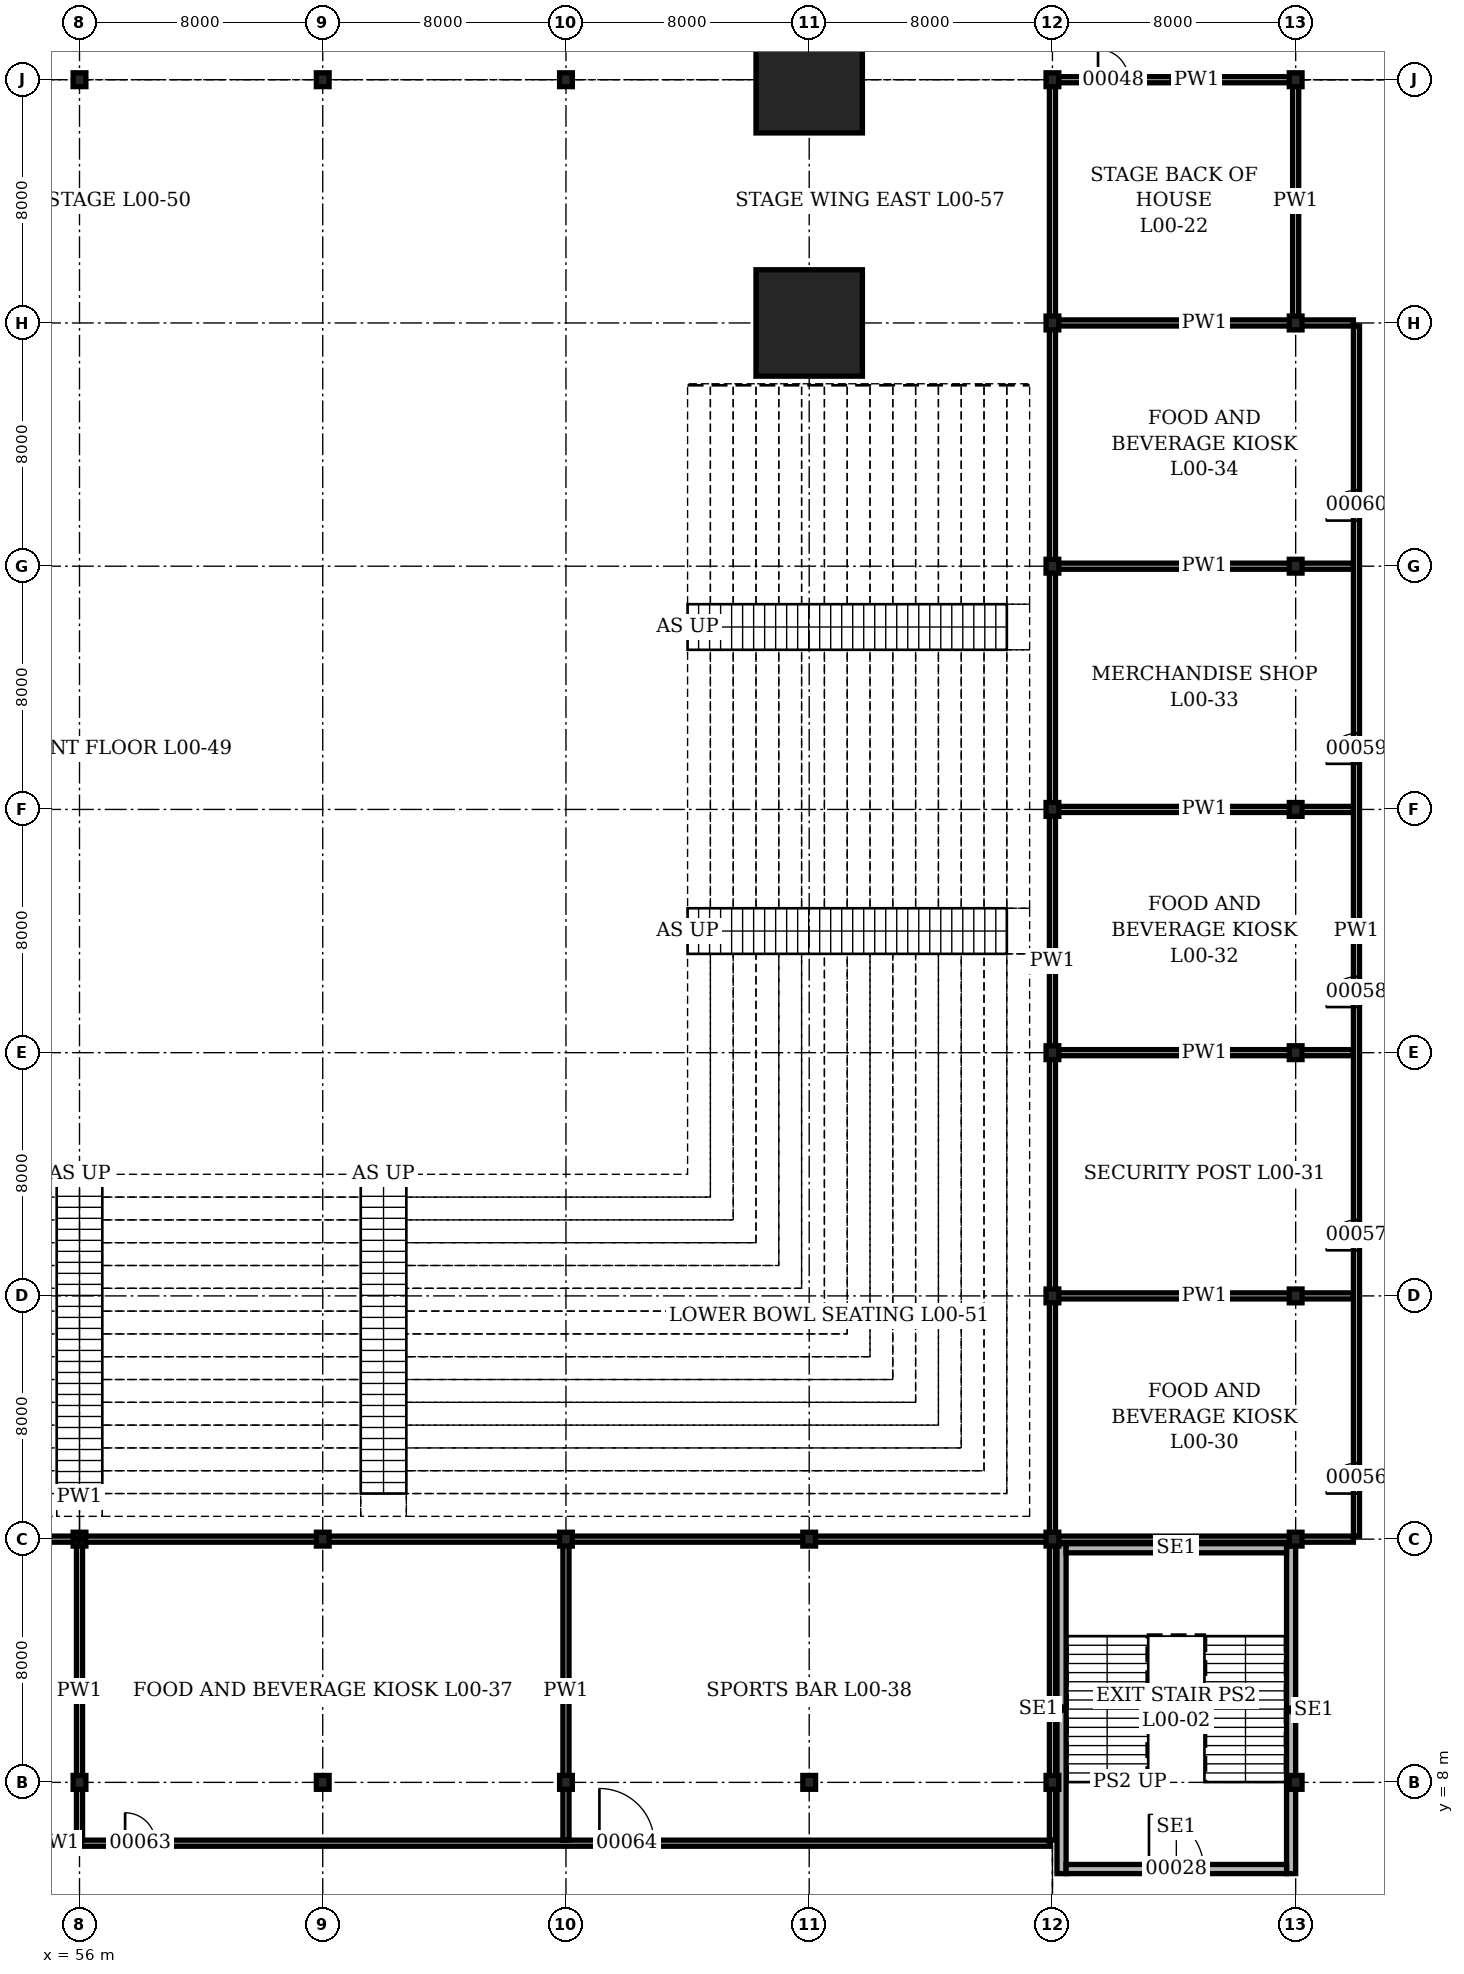
"""IFC4 building model, lengths in metres.
Left out: names, types, materials, properties, quantities, classifications, styles, units other than length and angle.
Written with IfcOpenShell. Run it as: python <this file> out.ifc"""

import sys

from ifc_helpers import new_model, si_unit, direction, frame, frame_2d, origin, origin_2d, place, context, subcontext, project, spatial, rectangle, hollow_rectangle, i_section, extrude, element, fill, save


model = new_model("IFC4")
c1 = context("Model", 3, precision=1e-05, world=origin(), true_north=direction((0.0, 1.0)))
c2 = subcontext(c1, "Body", "Model", "MODEL_VIEW")
j1 = project(units=[si_unit("LENGTHUNIT", "METRE"), si_unit("PLANEANGLEUNIT", "RADIAN")], contexts=[c1])
p1 = place(None, origin())
s1 = spatial("IfcSite", under=j1, at=p1, CompositionType="ELEMENT")
p2 = place(p1, origin())
s2 = spatial("IfcBuilding", under=s1, at=p2, CompositionType="ELEMENT")
p3 = place(p2, origin())
s3 = spatial("IfcBuildingStorey", under=s2, at=p3, CompositionType="ELEMENT", Elevation=0.0)
for number, where, z_axis, x_axis in (
    (1, (56.0, 8.0, 0.0), (0.0, 0.0, 1.0), (1.0, 0.0, 0.0)),
    (2, (56.0, 16.0, 0.0), (0.0, 0.0, 1.0), (1.0, 0.0, 0.0)),
    (3, (56.0, 64.0, 0.0), (0.0, 0.0, 1.0), (1.0, 0.0, 0.0)),
    (4, (64.0, 8.0, 0.0), (0.0, 0.0, 1.0), (1.0, 0.0, 0.0)),
    (5, (64.0, 16.0, 0.0), (0.0, 0.0, 1.0), (1.0, 0.0, 0.0)),
    (6, (64.0, 64.0, 0.0), (0.0, 0.0, 1.0), (1.0, 0.0, 0.0)),
    (7, (72.0, 8.0, 0.0), (0.0, 0.0, 1.0), (1.0, 0.0, 0.0)),
    (8, (72.0, 16.0, 0.0), (0.0, 0.0, 1.0), (1.0, 0.0, 0.0)),
    (9, (72.0, 64.0, 0.0), (0.0, 0.0, 1.0), (1.0, 0.0, 0.0)),
    (10, (80.0, 8.0, 0.0), (0.0, 0.0, 1.0), (1.0, 0.0, 0.0)),
    (11, (80.0, 16.0, 0.0), (0.0, 0.0, 1.0), (1.0, 0.0, 0.0)),
):
    element("IfcColumn", number, at=place(p3, frame(where, z_axis=z_axis, x_axis=x_axis)), inside=s3, PredefinedType="COLUMN", context=c2, shape_type="SweptSolid", body=[
        extrude(i_section(OverallWidth=0.419, OverallDepth=0.455, WebThickness=0.042, FlangeThickness=0.068, at=origin_2d()), origin(), (0.0, 0.0, 1.0), 4.9),
    ])
for number, where, z_axis, x_axis in (
    (12, (80.0, 56.0, 0.0), (0.0, 0.0, 1.0), (1.0, 0.0, 0.0)),
    (13, (80.0, 64.0, 0.0), (0.0, 0.0, 1.0), (1.0, 0.0, 0.0)),
):
    element("IfcColumn", number, at=place(p3, frame(where, z_axis=z_axis, x_axis=x_axis)), inside=s3, PredefinedType="COLUMN", context=c2, shape_type="SweptSolid", body=[
        extrude(hollow_rectangle(XDim=3.5, YDim=3.5, WallThickness=0.5, at=origin_2d()), origin(), (0.0, 0.0, 1.0), 4.9),
    ])
for number, where, z_axis, x_axis in (
    (14, (88.0, 8.0, 0.0), (0.0, 0.0, 1.0), (1.0, 0.0, 0.0)),
    (15, (88.0, 16.0, 0.0), (0.0, 0.0, 1.0), (1.0, 0.0, 0.0)),
    (16, (88.0, 24.0, 0.0), (0.0, 0.0, 1.0), (1.0, 0.0, 0.0)),
    (17, (88.0, 32.0, 0.0), (0.0, 0.0, 1.0), (1.0, 0.0, 0.0)),
    (18, (88.0, 40.0, 0.0), (0.0, 0.0, 1.0), (1.0, 0.0, 0.0)),
    (19, (88.0, 48.0, 0.0), (0.0, 0.0, 1.0), (1.0, 0.0, 0.0)),
    (20, (88.0, 56.0, 0.0), (0.0, 0.0, 1.0), (1.0, 0.0, 0.0)),
    (21, (88.0, 64.0, 0.0), (0.0, 0.0, 1.0), (1.0, 0.0, 0.0)),
    (22, (96.0, 8.0, 0.0), (0.0, 0.0, 1.0), (1.0, 0.0, 0.0)),
    (23, (96.0, 16.0, 0.0), (0.0, 0.0, 1.0), (1.0, 0.0, 0.0)),
    (24, (96.0, 24.0, 0.0), (0.0, 0.0, 1.0), (1.0, 0.0, 0.0)),
    (25, (96.0, 32.0, 0.0), (0.0, 0.0, 1.0), (1.0, 0.0, 0.0)),
    (26, (96.0, 40.0, 0.0), (0.0, 0.0, 1.0), (1.0, 0.0, 0.0)),
    (27, (96.0, 48.0, 0.0), (0.0, 0.0, 1.0), (1.0, 0.0, 0.0)),
    (28, (96.0, 56.0, 0.0), (0.0, 0.0, 1.0), (1.0, 0.0, 0.0)),
    (29, (96.0, 64.0, 0.0), (0.0, 0.0, 1.0), (1.0, 0.0, 0.0)),
):
    element("IfcColumn", number, at=place(p3, frame(where, z_axis=z_axis, x_axis=x_axis)), inside=s3, PredefinedType="COLUMN", context=c2, shape_type="SweptSolid", body=[
        extrude(i_section(OverallWidth=0.419, OverallDepth=0.455, WebThickness=0.042, FlangeThickness=0.068, at=origin_2d()), origin(), (0.0, 0.0, 1.0), 4.9),
    ])
p4 = place(p3, frame((88.3, 5.0, 0.0), z_axis=(0.0, 0.0, 1.0), x_axis=(0.0, 1.0, 0.0)))
e30 = element("IfcWall", 30, at=p4, inside=s3, PredefinedType="SOLIDWALL", context=c2, shape_type="SweptSolid", body=[
    extrude(rectangle(XDim=10.85, YDim=0.3, at=frame_2d((5.425, 0.0))), origin(), (0.0, 0.0, 1.0), 4.7),
])
p5 = place(p3, frame((95.85, 5.0, 0.0), z_axis=(0.0, 0.0, 1.0), x_axis=(0.0, 1.0, 0.0)))
e31 = element("IfcWall", 31, at=p5, inside=s3, PredefinedType="SOLIDWALL", context=c2, shape_type="SweptSolid", body=[
    extrude(rectangle(XDim=10.773, YDim=0.3, at=frame_2d((5.386, 0.0))), origin(), (0.0, 0.0, 1.0), 4.7),
])
p6 = place(p3, frame((88.45, 5.15, 0.0), z_axis=(0.0, 0.0, 1.0), x_axis=(1.0, 0.0, 0.0)))
e32 = element("IfcWall", 32, at=p6, inside=s3, PredefinedType="SOLIDWALL", context=c2, shape_type="SweptSolid", body=[
    extrude(rectangle(XDim=7.25, YDim=0.3, at=frame_2d((3.625, 0.0))), origin(), (0.0, 0.0, 1.0), 4.7),
])
p7 = place(p6, frame((2.725, 0.0, 0.0)))
e33 = element("IfcOpeningElement", 33, at=p7, cuts=e32, PredefinedType="OPENING", context=c2, shape_type="SweptSolid", body=[
    extrude(rectangle(XDim=1.8, YDim=2.1, at=frame_2d((0.9, 1.05))), frame((0.0, 0.16, 0.0), z_axis=(0.0, -1.0, 0.0), x_axis=(1.0, 0.0, 0.0)), (0.0, 0.0, 1.0), 0.32),
])
p8 = place(p3, frame((88.45, 15.7, 0.0), z_axis=(0.0, 0.0, 1.0), x_axis=(1.0, 0.0, 0.0)))
e34 = element("IfcWall", 34, at=p8, inside=s3, PredefinedType="SOLIDWALL", context=c2, shape_type="SweptSolid", body=[
    extrude(rectangle(XDim=7.25, YDim=0.3, at=frame_2d((3.625, 0.0))), origin(), (0.0, 0.0, 1.0), 4.7),
])
p9 = place(p3, frame((24.1, 6.0, 0.0), z_axis=(0.0, 0.0, 1.0), x_axis=(1.0, 0.0, 0.0)))
e35 = element("IfcWall", 35, at=p9, inside=s3, PredefinedType="PARTITIONING", context=c2, shape_type="SweptSolid", body=[
    extrude(rectangle(XDim=63.8, YDim=0.2, at=frame_2d((31.9, 0.0))), origin(), (0.0, 0.0, 1.0), 4.7),
])
p10 = place(p9, frame((1.4, 0.0, 0.0)))
e36 = element("IfcOpeningElement", 36, at=p10, cuts=e35, PredefinedType="OPENING", context=c2, shape_type="SweptSolid", body=[
    extrude(rectangle(XDim=1.0, YDim=2.1, at=frame_2d((0.5, 1.05))), frame((0.0, 0.11, 0.0), z_axis=(0.0, -1.0, 0.0), x_axis=(1.0, 0.0, 0.0)), (0.0, 0.0, 1.0), 0.22),
])
p11 = place(p9, frame((17.4, 0.0, 0.0)))
e37 = element("IfcOpeningElement", 37, at=p11, cuts=e35, PredefinedType="OPENING", context=c2, shape_type="SweptSolid", body=[
    extrude(rectangle(XDim=1.0, YDim=2.1, at=frame_2d((0.5, 1.05))), frame((0.0, 0.11, 0.0), z_axis=(0.0, -1.0, 0.0), x_axis=(1.0, 0.0, 0.0)), (0.0, 0.0, 1.0), 0.22),
])
p12 = place(p9, frame((33.4, 0.0, 0.0)))
e38 = element("IfcOpeningElement", 38, at=p12, cuts=e35, PredefinedType="OPENING", context=c2, shape_type="SweptSolid", body=[
    extrude(rectangle(XDim=1.0, YDim=2.1, at=frame_2d((0.5, 1.05))), frame((0.0, 0.11, 0.0), z_axis=(0.0, -1.0, 0.0), x_axis=(1.0, 0.0, 0.0)), (0.0, 0.0, 1.0), 0.22),
])
p13 = place(p9, frame((49.0, 0.0, 0.0)))
e39 = element("IfcOpeningElement", 39, at=p13, cuts=e35, PredefinedType="OPENING", context=c2, shape_type="SweptSolid", body=[
    extrude(rectangle(XDim=1.8, YDim=2.4, at=frame_2d((0.9, 1.2))), frame((0.0, 0.11, 0.0), z_axis=(0.0, -1.0, 0.0), x_axis=(1.0, 0.0, 0.0)), (0.0, 0.0, 1.0), 0.22),
])
p14 = place(p3, frame((14.1, 16.0, 0.0), z_axis=(0.0, 0.0, 1.0), x_axis=(1.0, 0.0, 0.0)))
e40 = element("IfcWall", 40, at=p14, inside=s3, PredefinedType="PARTITIONING", context=c2, shape_type="SweptSolid", body=[
    extrude(rectangle(XDim=83.8, YDim=0.2, at=frame_2d((41.9, 0.0))), origin(), (0.0, 0.0, 1.0), 3.928),
])
for number, where, z_axis, x_axis in (
    (41, (88.1, 24.0, 0.0), (0.0, 0.0, 1.0), (1.0, 0.0, 0.0)),
    (42, (88.1, 32.0, 0.0), (0.0, 0.0, 1.0), (1.0, 0.0, 0.0)),
    (43, (88.1, 40.0, 0.0), (0.0, 0.0, 1.0), (1.0, 0.0, 0.0)),
    (44, (88.1, 48.0, 0.0), (0.0, 0.0, 1.0), (1.0, 0.0, 0.0)),
    (45, (88.1, 56.0, 0.0), (0.0, 0.0, 1.0), (1.0, 0.0, 0.0)),
):
    element("IfcWall", number, at=place(p3, frame(where, z_axis=z_axis, x_axis=x_axis)), inside=s3, PredefinedType="PARTITIONING", context=c2, shape_type="SweptSolid", body=[
        extrude(rectangle(XDim=9.8, YDim=0.2, at=frame_2d((4.9, 0.0))), origin(), (0.0, 0.0, 1.0), 3.928),
    ])
p15 = place(p3, frame((88.1, 64.0, 0.0), z_axis=(0.0, 0.0, 1.0), x_axis=(1.0, 0.0, 0.0)))
e46 = element("IfcWall", 46, at=p15, inside=s3, PredefinedType="PARTITIONING", context=c2, shape_type="SweptSolid", body=[
    extrude(rectangle(XDim=7.8, YDim=0.2, at=frame_2d((3.9, 0.0))), origin(), (0.0, 0.0, 1.0), 3.928),
])
p16 = place(p15, frame((1.4, 0.0, 0.0)))
e47 = element("IfcOpeningElement", 47, at=p16, cuts=e46, PredefinedType="OPENING", context=c2, shape_type="SweptSolid", body=[
    extrude(rectangle(XDim=1.0, YDim=2.1, at=frame_2d((0.5, 1.05))), frame((0.0, 0.11, 0.0), z_axis=(0.0, -1.0, 0.0), x_axis=(1.0, 0.0, 0.0)), (0.0, 0.0, 1.0), 0.22),
])
for number, where, z_axis, x_axis in (
    (48, (56.0, 6.1, 0.0), (0.0, 0.0, 1.0), (0.0, 1.0, 0.0)),
    (49, (72.0, 6.1, 0.0), (0.0, 0.0, 1.0), (0.0, 1.0, 0.0)),
):
    element("IfcWall", number, at=place(p3, frame(where, z_axis=z_axis, x_axis=x_axis)), inside=s3, PredefinedType="PARTITIONING", context=c2, shape_type="SweptSolid", body=[
        extrude(rectangle(XDim=9.8, YDim=0.2, at=frame_2d((4.9, 0.0))), origin(), (0.0, 0.0, 1.0), 3.928),
    ])
p17 = place(p3, frame((88.0, 6.1, 0.0), z_axis=(0.0, 0.0, 1.0), x_axis=(0.0, 1.0, 0.0)))
e50 = element("IfcWall", 50, at=p17, inside=s3, PredefinedType="PARTITIONING", context=c2, shape_type="SweptSolid", body=[
    extrude(rectangle(XDim=57.8, YDim=0.2, at=frame_2d((28.9, 0.0))), origin(), (0.0, 0.0, 1.0), 3.928),
])
p18 = place(p3, frame((96.0, 56.1, 0.0), z_axis=(0.0, 0.0, 1.0), x_axis=(0.0, 1.0, 0.0)))
e51 = element("IfcWall", 51, at=p18, inside=s3, PredefinedType="PARTITIONING", context=c2, shape_type="SweptSolid", body=[
    extrude(rectangle(XDim=7.8, YDim=0.2, at=frame_2d((3.9, 0.0))), origin(), (0.0, 0.0, 1.0), 3.928),
])
p19 = place(p3, frame((98.0, 16.1, 0.0), z_axis=(0.0, 0.0, 1.0), x_axis=(0.0, 1.0, 0.0)))
e52 = element("IfcWall", 52, at=p19, inside=s3, PredefinedType="PARTITIONING", context=c2, shape_type="SweptSolid", body=[
    extrude(rectangle(XDim=39.8, YDim=0.2, at=frame_2d((19.9, 0.0))), origin(), (0.0, 0.0, 1.0), 4.7),
])
p20 = place(p19, frame((1.4, 0.0, 0.0)))
e53 = element("IfcOpeningElement", 53, at=p20, cuts=e52, PredefinedType="OPENING", context=c2, shape_type="SweptSolid", body=[
    extrude(rectangle(XDim=1.0, YDim=2.1, at=frame_2d((0.5, 1.05))), frame((0.0, 0.11, 0.0), z_axis=(0.0, -1.0, 0.0), x_axis=(1.0, 0.0, 0.0)), (0.0, 0.0, 1.0), 0.22),
])
p21 = place(p19, frame((9.4, 0.0, 0.0)))
e54 = element("IfcOpeningElement", 54, at=p21, cuts=e52, PredefinedType="OPENING", context=c2, shape_type="SweptSolid", body=[
    extrude(rectangle(XDim=1.0, YDim=2.1, at=frame_2d((0.5, 1.05))), frame((0.0, 0.11, 0.0), z_axis=(0.0, -1.0, 0.0), x_axis=(1.0, 0.0, 0.0)), (0.0, 0.0, 1.0), 0.22),
])
p22 = place(p19, frame((17.4, 0.0, 0.0)))
e55 = element("IfcOpeningElement", 55, at=p22, cuts=e52, PredefinedType="OPENING", context=c2, shape_type="SweptSolid", body=[
    extrude(rectangle(XDim=1.0, YDim=2.1, at=frame_2d((0.5, 1.05))), frame((0.0, 0.11, 0.0), z_axis=(0.0, -1.0, 0.0), x_axis=(1.0, 0.0, 0.0)), (0.0, 0.0, 1.0), 0.22),
])
p23 = place(p19, frame((25.4, 0.0, 0.0)))
e56 = element("IfcOpeningElement", 56, at=p23, cuts=e52, PredefinedType="OPENING", context=c2, shape_type="SweptSolid", body=[
    extrude(rectangle(XDim=1.0, YDim=2.1, at=frame_2d((0.5, 1.05))), frame((0.0, 0.11, 0.0), z_axis=(0.0, -1.0, 0.0), x_axis=(1.0, 0.0, 0.0)), (0.0, 0.0, 1.0), 0.22),
])
p24 = place(p19, frame((33.4, 0.0, 0.0)))
e57 = element("IfcOpeningElement", 57, at=p24, cuts=e52, PredefinedType="OPENING", context=c2, shape_type="SweptSolid", body=[
    extrude(rectangle(XDim=1.0, YDim=2.1, at=frame_2d((0.5, 1.05))), frame((0.0, 0.11, 0.0), z_axis=(0.0, -1.0, 0.0), x_axis=(1.0, 0.0, 0.0)), (0.0, 0.0, 1.0), 0.22),
])
p25 = place(p7, origin())
e58 = element("IfcDoor", 58, at=p25, inside=s3, OperationType="DOUBLE_DOOR_SINGLE_SWING", PredefinedType="DOOR", context=c2, shape_type="SweptSolid", body=[
    extrude(rectangle(XDim=1.8, YDim=2.1, at=frame_2d((0.9, 1.05))), frame((0.0, 0.15, 0.0), z_axis=(0.0, -1.0, 0.0), x_axis=(1.0, 0.0, 0.0)), (0.0, 0.0, 1.0), 0.3),
])
fill(e33, e58)
p26 = place(p16, origin())
e59 = element("IfcDoor", 59, at=p26, inside=s3, OperationType="SINGLE_SWING_LEFT", PredefinedType="DOOR", context=c2, shape_type="SweptSolid", body=[
    extrude(rectangle(XDim=1.0, YDim=2.1, at=frame_2d((0.5, 1.05))), frame((0.0, 0.1, 0.0), z_axis=(0.0, -1.0, 0.0), x_axis=(1.0, 0.0, 0.0)), (0.0, 0.0, 1.0), 0.199),
])
fill(e47, e59)
p27 = place(p20, origin())
e60 = element("IfcDoor", 60, at=p27, inside=s3, OperationType="SINGLE_SWING_LEFT", PredefinedType="DOOR", context=c2, shape_type="SweptSolid", body=[
    extrude(rectangle(XDim=1.0, YDim=2.1, at=frame_2d((0.5, 1.05))), frame((0.0, 0.1, 0.0), z_axis=(0.0, -1.0, 0.0), x_axis=(1.0, 0.0, 0.0)), (0.0, 0.0, 1.0), 0.199),
])
fill(e53, e60)
p28 = place(p21, origin())
e61 = element("IfcDoor", 61, at=p28, inside=s3, OperationType="SINGLE_SWING_LEFT", PredefinedType="DOOR", context=c2, shape_type="SweptSolid", body=[
    extrude(rectangle(XDim=1.0, YDim=2.1, at=frame_2d((0.5, 1.05))), frame((0.0, 0.1, 0.0), z_axis=(0.0, -1.0, 0.0), x_axis=(1.0, 0.0, 0.0)), (0.0, 0.0, 1.0), 0.199),
])
fill(e54, e61)
p29 = place(p22, origin())
e62 = element("IfcDoor", 62, at=p29, inside=s3, OperationType="SINGLE_SWING_LEFT", PredefinedType="DOOR", context=c2, shape_type="SweptSolid", body=[
    extrude(rectangle(XDim=1.0, YDim=2.1, at=frame_2d((0.5, 1.05))), frame((0.0, 0.1, 0.0), z_axis=(0.0, -1.0, 0.0), x_axis=(1.0, 0.0, 0.0)), (0.0, 0.0, 1.0), 0.199),
])
fill(e55, e62)
p30 = place(p23, origin())
e63 = element("IfcDoor", 63, at=p30, inside=s3, OperationType="SINGLE_SWING_LEFT", PredefinedType="DOOR", context=c2, shape_type="SweptSolid", body=[
    extrude(rectangle(XDim=1.0, YDim=2.1, at=frame_2d((0.5, 1.05))), frame((0.0, 0.1, 0.0), z_axis=(0.0, -1.0, 0.0), x_axis=(1.0, 0.0, 0.0)), (0.0, 0.0, 1.0), 0.199),
])
fill(e56, e63)
p31 = place(p24, origin())
e64 = element("IfcDoor", 64, at=p31, inside=s3, OperationType="SINGLE_SWING_LEFT", PredefinedType="DOOR", context=c2, shape_type="SweptSolid", body=[
    extrude(rectangle(XDim=1.0, YDim=2.1, at=frame_2d((0.5, 1.05))), frame((0.0, 0.1, 0.0), z_axis=(0.0, -1.0, 0.0), x_axis=(1.0, 0.0, 0.0)), (0.0, 0.0, 1.0), 0.199),
])
fill(e57, e64)
p32 = place(p12, origin())
e65 = element("IfcDoor", 65, at=p32, inside=s3, OperationType="SINGLE_SWING_LEFT", PredefinedType="DOOR", context=c2, shape_type="SweptSolid", body=[
    extrude(rectangle(XDim=1.0, YDim=2.1, at=frame_2d((0.5, 1.05))), frame((0.0, 0.1, 0.0), z_axis=(0.0, -1.0, 0.0), x_axis=(1.0, 0.0, 0.0)), (0.0, 0.0, 1.0), 0.199),
])
fill(e38, e65)
p33 = place(p13, origin())
e66 = element("IfcDoor", 66, at=p33, inside=s3, OperationType="DOUBLE_DOOR_DOUBLE_SWING", PredefinedType="DOOR", context=c2, shape_type="SweptSolid", body=[
    extrude(rectangle(XDim=1.8, YDim=2.4, at=frame_2d((0.9, 1.2))), frame((0.0, 0.1, 0.0), z_axis=(0.0, -1.0, 0.0), x_axis=(1.0, 0.0, 0.0)), (0.0, 0.0, 1.0), 0.199),
])
fill(e39, e66)
save(model, sys.argv[1])
